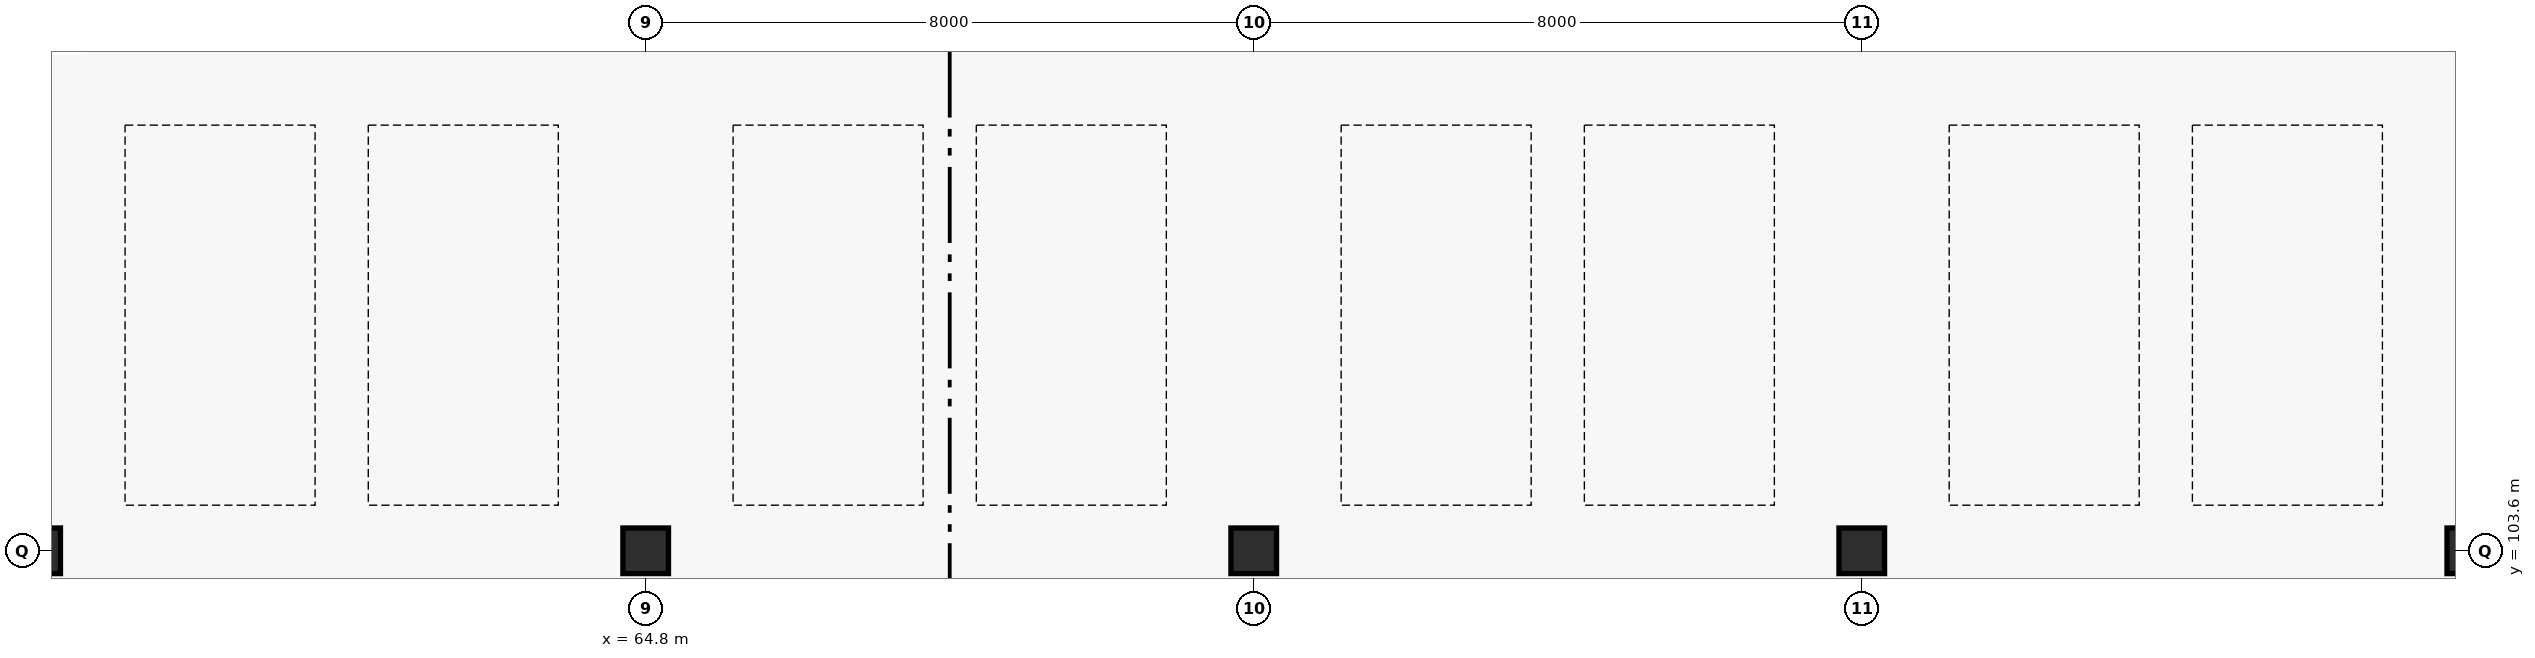
"""IFC4 building model, lengths in metres.
Left out: names, types, materials, properties, quantities, classifications, styles, units other than length and angle.
Written with IfcOpenShell. Run it as: python <this file> out.ifc"""

import sys

from ifc_helpers import new_model, si_unit, direction, frame, origin, origin_2d, place, context, subcontext, project, spatial, rectangle, extrude, element, save


model = new_model("IFC4")
c1 = context("Model", 3, precision=1e-05, world=origin(), true_north=direction((0.0, 1.0)))
c2 = subcontext(c1, "Body", "Model", "MODEL_VIEW")
j1 = project(units=[si_unit("LENGTHUNIT", "METRE"), si_unit("PLANEANGLEUNIT", "RADIAN")], contexts=[c1])
p1 = place(None, origin())
s1 = spatial("IfcSite", under=j1, at=p1, CompositionType="ELEMENT")
p2 = place(p1, origin())
s2 = spatial("IfcBuilding", under=s1, at=p2, CompositionType="ELEMENT")
p3 = place(p2, frame((0.0, 0.0, -4.8)))
s3 = spatial("IfcBuildingStorey", under=s2, at=p3, CompositionType="ELEMENT", Elevation=-4.8)
for number, where, z_axis, x_axis in (
    (1, (56.8, 103.6, 0.0), (0.0, 0.0, 1.0), (1.0, 0.0, 0.0)),
    (2, (64.8, 103.6, 0.0), (0.0, 0.0, 1.0), (1.0, 0.0, 0.0)),
    (3, (72.8, 103.6, 0.0), (0.0, 0.0, 1.0), (1.0, 0.0, 0.0)),
    (4, (80.8, 103.6, 0.0), (0.0, 0.0, 1.0), (1.0, 0.0, 0.0)),
    (5, (88.8, 103.6, 0.0), (0.0, 0.0, 1.0), (1.0, 0.0, 0.0)),
):
    element("IfcColumn", number, at=place(p3, frame(where, z_axis=z_axis, x_axis=x_axis)), inside=s3, PredefinedType="COLUMN", context=c2, shape_type="SweptSolid", body=[
        extrude(rectangle(XDim=0.6, YDim=0.6, at=origin_2d()), origin(), (0.0, 0.0, 1.0), 4.8),
    ])
save(model, sys.argv[1])
